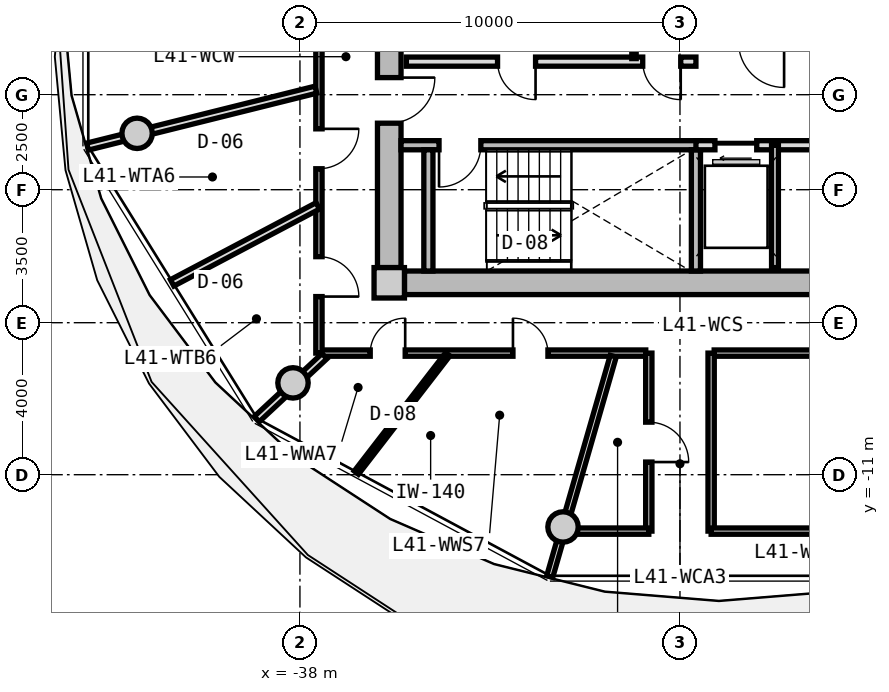
"""IFC4 building model, lengths in metres.
Left out: names, types, materials, properties, quantities, classifications, styles, units other than length and angle.
Written with IfcOpenShell. Run it as: python <this file> out.ifc"""

import sys

from ifc_helpers import new_model, si_unit, direction, frame, frame_2d, origin, origin_2d, place, context, subcontext, project, spatial, rectangle, circle, extrude, source, transform, mapped, element, fill, save


model = new_model("IFC4")
c1 = context("Model", 3, precision=1e-05, world=origin(), true_north=direction((0.0, 1.0)))
c2 = subcontext(c1, "Body", "Model", "MODEL_VIEW")
j1 = project(units=[si_unit("LENGTHUNIT", "METRE"), si_unit("PLANEANGLEUNIT", "RADIAN")], contexts=[c1])
p1 = place(None, origin())
s1 = spatial("IfcSite", under=j1, at=p1, CompositionType="ELEMENT")
p2 = place(p1, origin())
s2 = spatial("IfcBuilding", under=s1, at=p2, CompositionType="ELEMENT")
p3 = place(p2, frame((0.0, 0.0, 134.3)))
s3 = spatial("IfcBuildingStorey", under=s2, at=p3, CompositionType="ELEMENT", Elevation=134.3)
m1 = source(origin(), c2, "Body", "SweptSolid", [
    extrude(rectangle(XDim=0.8, YDim=0.8, at=origin_2d()), origin(), (0.0, 0.0, 1.0), 3.05),
])
p4 = place(p3, frame((-35.65, -5.95, 0.0), z_axis=(0.0, 0.0, 1.0), x_axis=(1.0, 0.0, 0.0)))
e1 = element("IfcColumn", 1, at=p4, inside=s3, PredefinedType="COLUMN", context=c2, shape_type="MappedRepresentation", body=[
    mapped(m1, transform((0.0, 0.0, 0.0), x_axis=(1.0, 0.0, 0.0), y_axis=(0.0, 1.0, 0.0), z_axis=(0.0, 0.0, 1.0), scale=1.0)),
])
m2 = source(origin(), c2, "Body", "SweptSolid", [
    extrude(rectangle(XDim=14.5, YDim=0.62, at=frame_2d((7.25, 0.0))), origin(), (0.0, 0.0, 1.0), 2.81),
])
p5 = place(p3, frame((-20.75, -5.95, 0.0), z_axis=(0.0, 0.0, 1.0), x_axis=(-1.0, 0.0, 0.0)))
e2 = element("IfcWall", 2, at=p5, inside=s3, PredefinedType="SHEAR", context=c2, shape_type="MappedRepresentation", body=[
    mapped(m2, transform((0.0, 0.0, 0.0), x_axis=(1.0, 0.0, 0.0), y_axis=(0.0, 1.0, 0.0), z_axis=(0.0, 0.0, 1.0), scale=1.0)),
])
m3 = source(origin(), c2, "Body", "SweptSolid", [
    extrude(rectangle(XDim=11.1, YDim=0.62, at=frame_2d((5.55, 0.0))), origin(), (0.0, 0.0, 1.0), 2.81),
])
p6 = place(p3, frame((-35.65, -5.55, 0.0), z_axis=(0.0, 0.0, 1.0), x_axis=(0.0, 1.0, 0.0)))
e3 = element("IfcWall", 3, at=p6, inside=s3, PredefinedType="SHEAR", context=c2, shape_type="MappedRepresentation", body=[
    mapped(m3, transform((0.0, 0.0, 0.0), x_axis=(1.0, 0.0, 0.0), y_axis=(0.0, 1.0, 0.0), z_axis=(0.0, 0.0, 1.0), scale=1.0)),
])
p7 = place(p6, frame((3.8, 0.0, 0.0)))
e4 = element("IfcOpeningElement", 4, at=p7, cuts=e3, PredefinedType="OPENING", context=c2, shape_type="SweptSolid", body=[
    extrude(rectangle(XDim=1.2, YDim=2.15, at=frame_2d((0.6, 1.075))), frame((0.0, 0.32, 0.0), z_axis=(0.0, -1.0, 0.0), x_axis=(1.0, 0.0, 0.0)), (0.0, 0.0, 1.0), 0.64),
])
m4 = source(origin(), c2, "Body", "SweptSolid", [
    extrude(circle(Radius=0.4, at=origin_2d()), origin(), (0.0, 0.0, 1.0), 3.47),
])
for number, where, z_axis, x_axis in (
    (5, (-42.285, -2.016, -0.42), (0.0, 0.0, 1.0), (1.0, 0.0, 0.0)),
    (6, (-38.183, -8.584, -0.42), (0.0, 0.0, 1.0), (1.0, 0.0, 0.0)),
    (7, (-31.077, -12.375, -0.42), (0.0, 0.0, 1.0), (1.0, 0.0, 0.0)),
):
    element("IfcColumn", number, at=place(p3, frame(where, z_axis=z_axis, x_axis=x_axis)), inside=s3, PredefinedType="COLUMN", context=c2, shape_type="MappedRepresentation", body=[
        mapped(m4, transform((0.0, 0.0, 0.0), x_axis=(1.0, 0.0, 0.0), y_axis=(0.0, 1.0, 0.0), z_axis=(0.0, 0.0, 1.0), scale=1.0)),
    ])
m5 = source(origin(), c2, "Body", "SweptSolid", [
    extrude(rectangle(XDim=7.88, YDim=0.24, at=frame_2d((3.94, 0.0))), origin(), (0.0, 0.0, 1.0), 2.81),
])
p8 = place(p3, frame((-35.34, -2.33, 0.0), z_axis=(0.0, 0.0, 1.0), x_axis=(1.0, 0.0, 0.0)))
e8 = element("IfcWall", 8, at=p8, inside=s3, PredefinedType="PARTITIONING", context=c2, shape_type="MappedRepresentation", body=[
    mapped(m5, transform((0.0, 0.0, 0.0), x_axis=(1.0, 0.0, 0.0), y_axis=(0.0, 1.0, 0.0), z_axis=(0.0, 0.0, 1.0), scale=1.0)),
])
p9 = place(p8, frame((1.0, 0.0, 0.0)))
e9 = element("IfcOpeningElement", 9, at=p9, cuts=e8, PredefinedType="OPENING", context=c2, shape_type="SweptSolid", body=[
    extrude(rectangle(XDim=1.1, YDim=2.15, at=frame_2d((0.55, 1.075))), frame((0.0, 0.13, 0.0), z_axis=(0.0, -1.0, 0.0), x_axis=(1.0, 0.0, 0.0)), (0.0, 0.0, 1.0), 0.26),
])
m6 = source(origin(), c2, "Body", "SweptSolid", [
    extrude(rectangle(XDim=3.19, YDim=0.24, at=frame_2d((1.595, 0.0))), origin(), (0.0, 0.0, 1.0), 2.81),
])
for number, where, z_axis, x_axis in (
    (10, (-34.62, -5.64, 0.0), (0.0, 0.0, 1.0), (0.0, 1.0, 0.0)),
    (11, (-27.58, -5.64, 0.0), (0.0, 0.0, 1.0), (0.0, 1.0, 0.0)),
):
    element("IfcWall", number, at=place(p3, frame(where, z_axis=z_axis, x_axis=x_axis)), inside=s3, PredefinedType="PARTITIONING", context=c2, shape_type="MappedRepresentation", body=[
        mapped(m6, transform((0.0, 0.0, 0.0), x_axis=(1.0, 0.0, 0.0), y_axis=(0.0, 1.0, 0.0), z_axis=(0.0, 0.0, 1.0), scale=1.0)),
    ])
m7 = source(origin(), c2, "Body", "SweptSolid", [
    extrude(rectangle(XDim=7.62, YDim=0.24, at=frame_2d((3.81, 0.0))), origin(), (0.0, 0.0, 1.0), 2.795),
])
p10 = place(p3, frame((-35.2, -0.13, 0.0), z_axis=(0.0, 0.0, 1.0), x_axis=(1.0, 0.0, 0.0)))
e12 = element("IfcWall", 12, at=p10, inside=s3, PredefinedType="PARTITIONING", context=c2, shape_type="MappedRepresentation", body=[
    mapped(m7, transform((0.0, 0.0, 0.0), x_axis=(1.0, 0.0, 0.0), y_axis=(0.0, 1.0, 0.0), z_axis=(0.0, 0.0, 1.0), scale=1.0)),
])
p11 = place(p10, frame((6.22, 0.0, 0.0)))
e13 = element("IfcOpeningElement", 13, at=p11, cuts=e12, PredefinedType="OPENING", context=c2, shape_type="SweptSolid", body=[
    extrude(rectangle(XDim=1.0, YDim=2.1, at=frame_2d((0.5, 1.05))), frame((0.0, 0.13, 0.0), z_axis=(0.0, -1.0, 0.0), x_axis=(1.0, 0.0, 0.0)), (0.0, 0.0, 1.0), 0.26),
])
p12 = place(p10, frame((2.4, 0.0, 0.0)))
e14 = element("IfcOpeningElement", 14, at=p12, cuts=e12, PredefinedType="OPENING", context=c2, shape_type="SweptSolid", body=[
    extrude(rectangle(XDim=1.0, YDim=2.1, at=frame_2d((0.5, 1.05))), frame((0.0, 0.13, 0.0), z_axis=(0.0, -1.0, 0.0), x_axis=(1.0, 0.0, 0.0)), (0.0, 0.0, 1.0), 0.26),
])
m8 = source(origin(), c2, "Body", "SweptSolid", [
    extrude(rectangle(XDim=2.33, YDim=0.115, at=frame_2d((1.165, 0.0))), origin(), (0.0, 0.0, 1.0), 2.795),
])
p13 = place(p3, frame((-29.21, -0.05, 0.0), z_axis=(0.0, 0.0, 1.0), x_axis=(0.0, 1.0, 0.0)))
e15 = element("IfcWall", 15, at=p13, inside=s3, PredefinedType="PARTITIONING", context=c2, shape_type="MappedRepresentation", body=[
    mapped(m8, transform((0.0, 0.0, 0.0), x_axis=(1.0, 0.0, 0.0), y_axis=(0.0, 1.0, 0.0), z_axis=(0.0, 0.0, 1.0), scale=1.0)),
])
m9 = source(origin(), c2, "Body", "SweptSolid", [
    extrude(rectangle(XDim=4.13, YDim=0.24, at=frame_2d((2.065, 0.0))), origin(), (0.0, 0.0, 1.0), 2.795),
])
p14 = place(p3, frame((-27.58, -2.33, 0.0), z_axis=(0.0, 0.0, 1.0), x_axis=(1.0, 0.0, 0.0)))
e16 = element("IfcWall", 16, at=p14, inside=s3, PredefinedType="PARTITIONING", context=c2, shape_type="MappedRepresentation", body=[
    mapped(m9, transform((0.0, 0.0, 0.0), x_axis=(1.0, 0.0, 0.0), y_axis=(0.0, 1.0, 0.0), z_axis=(0.0, 0.0, 1.0), scale=1.0)),
])
p15 = place(p14, frame((0.5, 0.0, 0.0)))
e17 = element("IfcOpeningElement", 17, at=p15, cuts=e16, PredefinedType="OPENING", context=c2, shape_type="SweptSolid", body=[
    extrude(rectangle(XDim=1.1, YDim=2.2, at=frame_2d((0.55, 1.1))), frame((0.0, 0.13, 0.0), z_axis=(0.0, -1.0, 0.0), x_axis=(1.0, 0.0, 0.0)), (0.0, 0.0, 1.0), 0.26),
])
m10 = source(origin(), c2, "Body", "SweptSolid", [
    extrude(rectangle(XDim=3.22, YDim=0.18, at=frame_2d((1.61, 0.0))), origin(), (0.0, 0.0, 1.0), 2.795),
])
p16 = place(p3, frame((-25.5, -5.55, 0.0), z_axis=(0.0, 0.0, 1.0), x_axis=(0.0, 1.0, 0.0)))
e18 = element("IfcWall", 18, at=p16, inside=s3, PredefinedType="PARTITIONING", context=c2, shape_type="MappedRepresentation", body=[
    mapped(m10, transform((0.0, 0.0, 0.0), x_axis=(1.0, 0.0, 0.0), y_axis=(0.0, 1.0, 0.0), z_axis=(0.0, 0.0, 1.0), scale=1.0)),
])
m11 = source(origin(), c2, "Body", "SweptSolid", [
    extrude(rectangle(XDim=8.6, YDim=0.165, at=frame_2d((4.3, 0.0))), origin(), (0.0, 0.0, 1.0), 2.795),
])
p17 = place(p3, frame((-18.5, -7.8, 0.0), z_axis=(0.0, 0.0, 1.0), x_axis=(-1.0, 0.0, 0.0)))
e19 = element("IfcWall", 19, at=p17, inside=s3, PredefinedType="PARTITIONING", context=c2, shape_type="MappedRepresentation", body=[
    mapped(m11, transform((0.0, 0.0, 0.0), x_axis=(1.0, 0.0, 0.0), y_axis=(0.0, 1.0, 0.0), z_axis=(0.0, 0.0, 1.0), scale=1.0)),
])
p18 = place(p17, frame((3.775, 0.0, 0.0)))
e20 = element("IfcOpeningElement", 20, at=p18, cuts=e19, PredefinedType="OPENING", context=c2, shape_type="SweptSolid", body=[
    extrude(rectangle(XDim=1.05, YDim=2.15, at=frame_2d((0.525, 1.075))), frame((0.0, 0.093, 0.0), z_axis=(0.0, -1.0, 0.0), x_axis=(1.0, 0.0, 0.0)), (0.0, 0.0, 1.0), 0.185),
])
p19 = place(p3, frame((-28.9, -7.8, 0.0), z_axis=(0.0, 0.0, 1.0), x_axis=(-1.0, 0.0, 0.0)))
e21 = element("IfcWall", 21, at=p19, inside=s3, PredefinedType="PARTITIONING", context=c2, shape_type="MappedRepresentation", body=[
    mapped(m11, transform((0.0, 0.0, 0.0), x_axis=(1.0, 0.0, 0.0), y_axis=(0.0, 1.0, 0.0), z_axis=(0.0, 0.0, 1.0), scale=1.0)),
])
p20 = place(p19, frame((6.33, 0.0, 0.0)))
e22 = element("IfcOpeningElement", 22, at=p20, cuts=e21, PredefinedType="OPENING", context=c2, shape_type="SweptSolid", body=[
    extrude(rectangle(XDim=0.92, YDim=2.1, at=frame_2d((0.46, 1.05))), frame((0.0, 0.093, 0.0), z_axis=(0.0, -1.0, 0.0), x_axis=(1.0, 0.0, 0.0)), (0.0, 0.0, 1.0), 0.185),
])
p21 = place(p19, frame((2.575, 0.0, 0.0)))
e23 = element("IfcOpeningElement", 23, at=p21, cuts=e21, PredefinedType="OPENING", context=c2, shape_type="SweptSolid", body=[
    extrude(rectangle(XDim=0.92, YDim=2.1, at=frame_2d((0.46, 1.05))), frame((0.0, 0.093, 0.0), z_axis=(0.0, -1.0, 0.0), x_axis=(1.0, 0.0, 0.0)), (0.0, 0.0, 1.0), 0.185),
])
m12 = source(origin(), c2, "Body", "SweptSolid", [
    extrude(rectangle(XDim=15.6, YDim=0.165, at=frame_2d((7.8, 0.0))), origin(), (0.0, 0.0, 1.0), 2.795),
])
p22 = place(p3, frame((-37.5, -7.8, 0.0), z_axis=(0.0, 0.0, 1.0), x_axis=(0.0, 1.0, 0.0)))
e24 = element("IfcWall", 24, at=p22, inside=s3, PredefinedType="PARTITIONING", context=c2, shape_type="MappedRepresentation", body=[
    mapped(m12, transform((0.0, 0.0, 0.0), x_axis=(1.0, 0.0, 0.0), y_axis=(0.0, 1.0, 0.0), z_axis=(0.0, 0.0, 1.0), scale=1.0)),
])
p23 = place(p22, frame((8.95, 0.0, 0.0)))
e25 = element("IfcOpeningElement", 25, at=p23, cuts=e24, PredefinedType="OPENING", context=c2, shape_type="SweptSolid", body=[
    extrude(rectangle(XDim=1.25, YDim=2.2, at=frame_2d((0.625, 1.1))), frame((0.0, 0.093, 0.0), z_axis=(0.0, -1.0, 0.0), x_axis=(1.0, 0.0, 0.0)), (0.0, 0.0, 1.0), 0.185),
])
p24 = place(p22, frame((4.851, 0.0, 0.0)))
e26 = element("IfcOpeningElement", 26, at=p24, cuts=e24, PredefinedType="OPENING", context=c2, shape_type="SweptSolid", body=[
    extrude(rectangle(XDim=1.05, YDim=2.15, at=frame_2d((0.525, 1.075))), frame((0.0, 0.093, 0.0), z_axis=(0.0, -1.0, 0.0), x_axis=(1.0, 0.0, 0.0)), (0.0, 0.0, 1.0), 0.185),
])
p25 = place(p22, frame((1.488, 0.0, 0.0)))
e27 = element("IfcOpeningElement", 27, at=p25, cuts=e24, PredefinedType="OPENING", context=c2, shape_type="SweptSolid", body=[
    extrude(rectangle(XDim=1.05, YDim=2.15, at=frame_2d((0.525, 1.075))), frame((0.0, 0.093, 0.0), z_axis=(0.0, -1.0, 0.0), x_axis=(1.0, 0.0, 0.0)), (0.0, 0.0, 1.0), 0.185),
])
m13 = source(origin(), c2, "Body", "SweptSolid", [
    extrude(rectangle(XDim=6.035, YDim=0.165, at=frame_2d((3.018, 0.0))), origin(), (0.0, 0.0, 1.0), 2.345),
])
p26 = place(p3, frame((-29.756, -7.88, 0.0), z_axis=(0.0, 0.0, 1.0), x_axis=(-0.276809454862, -0.960924828329, 0.0)))
e28 = element("IfcWall", 28, at=p26, inside=s3, PredefinedType="PARTITIONING", context=c2, shape_type="MappedRepresentation", body=[
    mapped(m13, transform((0.0, 0.0, 0.0), x_axis=(1.0, 0.0, 0.0), y_axis=(0.0, 1.0, 0.0), z_axis=(0.0, 0.0, 1.0), scale=1.0)),
])
m14 = source(origin(), c2, "Body", "SweptSolid", [
    extrude(rectangle(XDim=4.685, YDim=0.165, at=frame_2d((2.342, 0.0))), origin(), (0.0, 0.0, 1.0), 2.795),
])
p27 = place(p3, frame((-28.82, -12.485, 0.0), z_axis=(0.0, 0.0, 1.0), x_axis=(0.0, 1.0, 0.0)))
e29 = element("IfcWall", 29, at=p27, inside=s3, PredefinedType="PARTITIONING", context=c2, shape_type="MappedRepresentation", body=[
    mapped(m14, transform((0.0, 0.0, 0.0), x_axis=(1.0, 0.0, 0.0), y_axis=(0.0, 1.0, 0.0), z_axis=(0.0, 0.0, 1.0), scale=1.0)),
])
p28 = place(p27, frame((1.817, 0.0, 0.0)))
e30 = element("IfcOpeningElement", 30, at=p28, cuts=e29, PredefinedType="OPENING", context=c2, shape_type="SweptSolid", body=[
    extrude(rectangle(XDim=1.05, YDim=2.15, at=frame_2d((0.525, 1.075))), frame((0.0, 0.093, 0.0), z_axis=(0.0, -1.0, 0.0), x_axis=(1.0, 0.0, 0.0)), (0.0, 0.0, 1.0), 0.185),
])
m15 = source(origin(), c2, "Body", "SweptSolid", [
    extrude(rectangle(XDim=2.419, YDim=0.165, at=frame_2d((1.209, 0.0))), origin(), (0.0, 0.0, 1.0), 2.345),
])
p29 = place(p3, frame((-31.239, -12.485, 0.0), z_axis=(0.0, 0.0, 1.0), x_axis=(1.0, 0.0, 0.0)))
e31 = element("IfcWall", 31, at=p29, inside=s3, PredefinedType="PARTITIONING", context=c2, shape_type="MappedRepresentation", body=[
    mapped(m15, transform((0.0, 0.0, 0.0), x_axis=(1.0, 0.0, 0.0), y_axis=(0.0, 1.0, 0.0), z_axis=(0.0, 0.0, 1.0), scale=1.0)),
])
p30 = place(p3, frame((-27.18, -12.485, 0.0), z_axis=(0.0, 0.0, 1.0), x_axis=(0.0, 1.0, 0.0)))
e32 = element("IfcWall", 32, at=p30, inside=s3, PredefinedType="PARTITIONING", context=c2, shape_type="MappedRepresentation", body=[
    mapped(m14, transform((0.0, 0.0, 0.0), x_axis=(1.0, 0.0, 0.0), y_axis=(0.0, 1.0, 0.0), z_axis=(0.0, 0.0, 1.0), scale=1.0)),
])
m16 = source(origin(), c2, "Body", "SweptSolid", [
    extrude(rectangle(XDim=7.139, YDim=0.165, at=frame_2d((3.569, 0.0))), origin(), (0.0, 0.0, 1.0), 2.345),
])
p31 = place(p3, frame((-27.18, -12.485, 0.0), z_axis=(0.0, 0.0, 1.0), x_axis=(1.0, 0.0, 0.0)))
e33 = element("IfcWall", 33, at=p31, inside=s3, PredefinedType="PARTITIONING", context=c2, shape_type="MappedRepresentation", body=[
    mapped(m16, transform((0.0, 0.0, 0.0), x_axis=(1.0, 0.0, 0.0), y_axis=(0.0, 1.0, 0.0), z_axis=(0.0, 0.0, 1.0), scale=1.0)),
])
m17 = source(origin(), c2, "Body", "SweptSolid", [
    extrude(rectangle(XDim=6.193, YDim=0.19, at=frame_2d((3.096, 0.0))), origin(), (0.0, 0.0, 1.0), 2.345),
])
p32 = place(p3, frame((-37.58, -0.868, 0.0), z_axis=(0.0, 0.0, 1.0), x_axis=(-0.970309243466, -0.241867674657, 0.0)))
e34 = element("IfcWall", 34, at=p32, inside=s3, PredefinedType="PARTITIONING", context=c2, shape_type="MappedRepresentation", body=[
    mapped(m17, transform((0.0, 0.0, 0.0), x_axis=(1.0, 0.0, 0.0), y_axis=(0.0, 1.0, 0.0), z_axis=(0.0, 0.0, 1.0), scale=1.0)),
])
m18 = source(origin(), c2, "Body", "SweptSolid", [
    extrude(rectangle(XDim=2.435, YDim=0.19, at=frame_2d((1.217, 0.0))), origin(), (0.0, 0.0, 1.0), 2.345),
])
p33 = place(p3, frame((-37.354, -7.88, 0.0), z_axis=(0.0, 0.0, 1.0), x_axis=(-0.732164643118, -0.681127693878, 0.0)))
e35 = element("IfcWall", 35, at=p33, inside=s3, PredefinedType="PARTITIONING", context=c2, shape_type="MappedRepresentation", body=[
    mapped(m18, transform((0.0, 0.0, 0.0), x_axis=(1.0, 0.0, 0.0), y_axis=(0.0, 1.0, 0.0), z_axis=(0.0, 0.0, 1.0), scale=1.0)),
])
m19 = source(origin(), c2, "Body", "SweptSolid", [
    extrude(rectangle(XDim=4.335, YDim=0.19, at=frame_2d((2.168, 0.0))), origin(), (0.0, 0.0, 1.0), 2.795),
])
p34 = place(p3, frame((-37.53, -3.926, 0.0), z_axis=(0.0, 0.0, 1.0), x_axis=(-0.884108234352, -0.4672821738, 0.0)))
e36 = element("IfcWall", 36, at=p34, inside=s3, PredefinedType="PARTITIONING", context=c2, shape_type="MappedRepresentation", body=[
    mapped(m19, transform((0.0, 0.0, 0.0), x_axis=(1.0, 0.0, 0.0), y_axis=(0.0, 1.0, 0.0), z_axis=(0.0, 0.0, 1.0), scale=1.0)),
])
m20 = source(origin(), c2, "Body", "SweptSolid", [
    extrude(rectangle(XDim=3.937, YDim=0.14, at=frame_2d((1.968, 0.0))), origin(), (0.0, 0.0, 1.0), 2.795),
])
p35 = place(p3, frame((-34.11, -7.83, 0.0), z_axis=(0.0, 0.0, 1.0), x_axis=(-0.611016723561, -0.791617687731, 0.0)))
e37 = element("IfcWall", 37, at=p35, inside=s3, PredefinedType="PARTITIONING", context=c2, shape_type="MappedRepresentation", body=[
    mapped(m20, transform((0.0, 0.0, 0.0), x_axis=(1.0, 0.0, 0.0), y_axis=(0.0, 1.0, 0.0), z_axis=(0.0, 0.0, 1.0), scale=1.0)),
])
m21 = source(origin(), c2, "Body", "SweptSolid", [
    extrude(rectangle(XDim=1.1, YDim=2.15, at=frame_2d((0.55, 1.075))), frame((0.0, 0.025, 0.0), z_axis=(0.0, -1.0, 0.0), x_axis=(1.0, 0.0, 0.0)), (0.0, 0.0, 1.0), 0.05),
])
p36 = place(p9, frame((1.1, 0.0, 0.0), z_axis=(0.0, 0.0, 1.0), x_axis=(-1.0, 0.0, 0.0)))
e38 = element("IfcDoor", 38, at=p36, inside=s3, OperationType="SINGLE_SWING_RIGHT", PredefinedType="DOOR", context=c2, shape_type="MappedRepresentation", body=[
    mapped(m21, transform((0.0, 0.0, 0.0), x_axis=(1.0, 0.0, 0.0), y_axis=(0.0, 1.0, 0.0), z_axis=(0.0, 0.0, 1.0), scale=1.0)),
])
fill(e9, e38)
m22 = source(origin(), c2, "Body", "SweptSolid", [
    extrude(rectangle(XDim=1.2, YDim=2.15, at=frame_2d((0.6, 1.075))), frame((0.0, 0.025, 0.0), z_axis=(0.0, -1.0, 0.0), x_axis=(1.0, 0.0, 0.0)), (0.0, 0.0, 1.0), 0.05),
])
p37 = place(p7, frame((1.2, 0.0, 0.0), z_axis=(0.0, 0.0, 1.0), x_axis=(-1.0, 0.0, 0.0)))
e39 = element("IfcDoor", 39, at=p37, inside=s3, OperationType="SINGLE_SWING_LEFT", PredefinedType="DOOR", context=c2, shape_type="MappedRepresentation", body=[
    mapped(m22, transform((0.0, 0.0, 0.0), x_axis=(1.0, 0.0, 0.0), y_axis=(0.0, 1.0, 0.0), z_axis=(0.0, 0.0, 1.0), scale=1.0)),
])
fill(e4, e39)
m23 = source(origin(), c2, "Body", "SweptSolid", [
    extrude(rectangle(XDim=1.0, YDim=2.1, at=frame_2d((0.5, 1.05))), frame((0.0, 0.025, 0.0), z_axis=(0.0, -1.0, 0.0), x_axis=(1.0, 0.0, 0.0)), (0.0, 0.0, 1.0), 0.05),
])
p38 = place(p11, frame((1.0, 0.0, 0.0), z_axis=(0.0, 0.0, 1.0), x_axis=(-1.0, 0.0, 0.0)))
e40 = element("IfcDoor", 40, at=p38, inside=s3, OperationType="SINGLE_SWING_LEFT", PredefinedType="DOOR", context=c2, shape_type="MappedRepresentation", body=[
    mapped(m23, transform((0.0, 0.0, 0.0), x_axis=(1.0, 0.0, 0.0), y_axis=(0.0, 1.0, 0.0), z_axis=(0.0, 0.0, 1.0), scale=1.0)),
])
fill(e13, e40)
p39 = place(p12, frame((1.0, 0.0, 0.0), z_axis=(0.0, 0.0, 1.0), x_axis=(-1.0, 0.0, 0.0)))
e41 = element("IfcDoor", 41, at=p39, inside=s3, OperationType="SINGLE_SWING_LEFT", PredefinedType="DOOR", context=c2, shape_type="MappedRepresentation", body=[
    mapped(m23, transform((0.0, 0.0, 0.0), x_axis=(1.0, 0.0, 0.0), y_axis=(0.0, 1.0, 0.0), z_axis=(0.0, 0.0, 1.0), scale=1.0)),
])
fill(e14, e41)
m24 = source(origin(), c2, "Body", "SweptSolid", [
    extrude(rectangle(XDim=1.1, YDim=2.2, at=frame_2d((0.55, 1.1))), frame((0.0, 0.025, 0.0), z_axis=(0.0, -1.0, 0.0), x_axis=(1.0, 0.0, 0.0)), (0.0, 0.0, 1.0), 0.05),
])
p40 = place(p15, frame((1.1, 0.0, 0.0), z_axis=(0.0, 0.0, 1.0), x_axis=(-1.0, 0.0, 0.0)))
e42 = element("IfcDoor", 42, at=p40, inside=s3, OperationType="SLIDING_TO_LEFT", PredefinedType="DOOR", context=c2, shape_type="MappedRepresentation", body=[
    mapped(m24, transform((0.0, 0.0, 0.0), x_axis=(1.0, 0.0, 0.0), y_axis=(0.0, 1.0, 0.0), z_axis=(0.0, 0.0, 1.0), scale=1.0)),
])
fill(e17, e42)
m25 = source(origin(), c2, "Body", "SweptSolid", [
    extrude(rectangle(XDim=1.05, YDim=2.15, at=frame_2d((0.525, 1.075))), frame((0.0, 0.025, 0.0), z_axis=(0.0, -1.0, 0.0), x_axis=(1.0, 0.0, 0.0)), (0.0, 0.0, 1.0), 0.05),
])
p41 = place(p28, frame((1.05, 0.0, 0.0), z_axis=(0.0, 0.0, 1.0), x_axis=(-1.0, 0.0, 0.0)))
e43 = element("IfcDoor", 43, at=p41, inside=s3, OperationType="SINGLE_SWING_RIGHT", PredefinedType="DOOR", context=c2, shape_type="MappedRepresentation", body=[
    mapped(m25, transform((0.0, 0.0, 0.0), x_axis=(1.0, 0.0, 0.0), y_axis=(0.0, 1.0, 0.0), z_axis=(0.0, 0.0, 1.0), scale=1.0)),
])
fill(e30, e43)
p42 = place(p24, frame((1.05, 0.0, 0.0), z_axis=(0.0, 0.0, 1.0), x_axis=(-1.0, 0.0, 0.0)))
e44 = element("IfcDoor", 44, at=p42, inside=s3, OperationType="SINGLE_SWING_LEFT", PredefinedType="DOOR", context=c2, shape_type="MappedRepresentation", body=[
    mapped(m25, transform((0.0, 0.0, 0.0), x_axis=(1.0, 0.0, 0.0), y_axis=(0.0, 1.0, 0.0), z_axis=(0.0, 0.0, 1.0), scale=1.0)),
])
fill(e26, e44)
p43 = place(p25, frame((1.05, 0.0, 0.0), z_axis=(0.0, 0.0, 1.0), x_axis=(-1.0, 0.0, 0.0)))
e45 = element("IfcDoor", 45, at=p43, inside=s3, OperationType="SINGLE_SWING_RIGHT", PredefinedType="DOOR", context=c2, shape_type="MappedRepresentation", body=[
    mapped(m25, transform((0.0, 0.0, 0.0), x_axis=(1.0, 0.0, 0.0), y_axis=(0.0, 1.0, 0.0), z_axis=(0.0, 0.0, 1.0), scale=1.0)),
])
fill(e27, e45)
m26 = source(origin(), c2, "Body", "SweptSolid", [
    extrude(rectangle(XDim=0.92, YDim=2.1, at=frame_2d((0.46, 1.05))), frame((0.0, 0.025, 0.0), z_axis=(0.0, -1.0, 0.0), x_axis=(1.0, 0.0, 0.0)), (0.0, 0.0, 1.0), 0.05),
])
p44 = place(p20, frame((0.92, 0.0, 0.0), z_axis=(0.0, 0.0, 1.0), x_axis=(-1.0, 0.0, 0.0)))
e46 = element("IfcDoor", 46, at=p44, inside=s3, OperationType="SINGLE_SWING_RIGHT", PredefinedType="DOOR", context=c2, shape_type="MappedRepresentation", body=[
    mapped(m26, transform((0.0, 0.0, 0.0), x_axis=(1.0, 0.0, 0.0), y_axis=(0.0, 1.0, 0.0), z_axis=(0.0, 0.0, 1.0), scale=1.0)),
])
fill(e22, e46)
p45 = place(p21, frame((0.92, 0.0, 0.0), z_axis=(0.0, 0.0, 1.0), x_axis=(-1.0, 0.0, 0.0)))
e47 = element("IfcDoor", 47, at=p45, inside=s3, OperationType="SINGLE_SWING_LEFT", PredefinedType="DOOR", context=c2, shape_type="MappedRepresentation", body=[
    mapped(m26, transform((0.0, 0.0, 0.0), x_axis=(1.0, 0.0, 0.0), y_axis=(0.0, 1.0, 0.0), z_axis=(0.0, 0.0, 1.0), scale=1.0)),
])
fill(e23, e47)
save(model, sys.argv[1])
